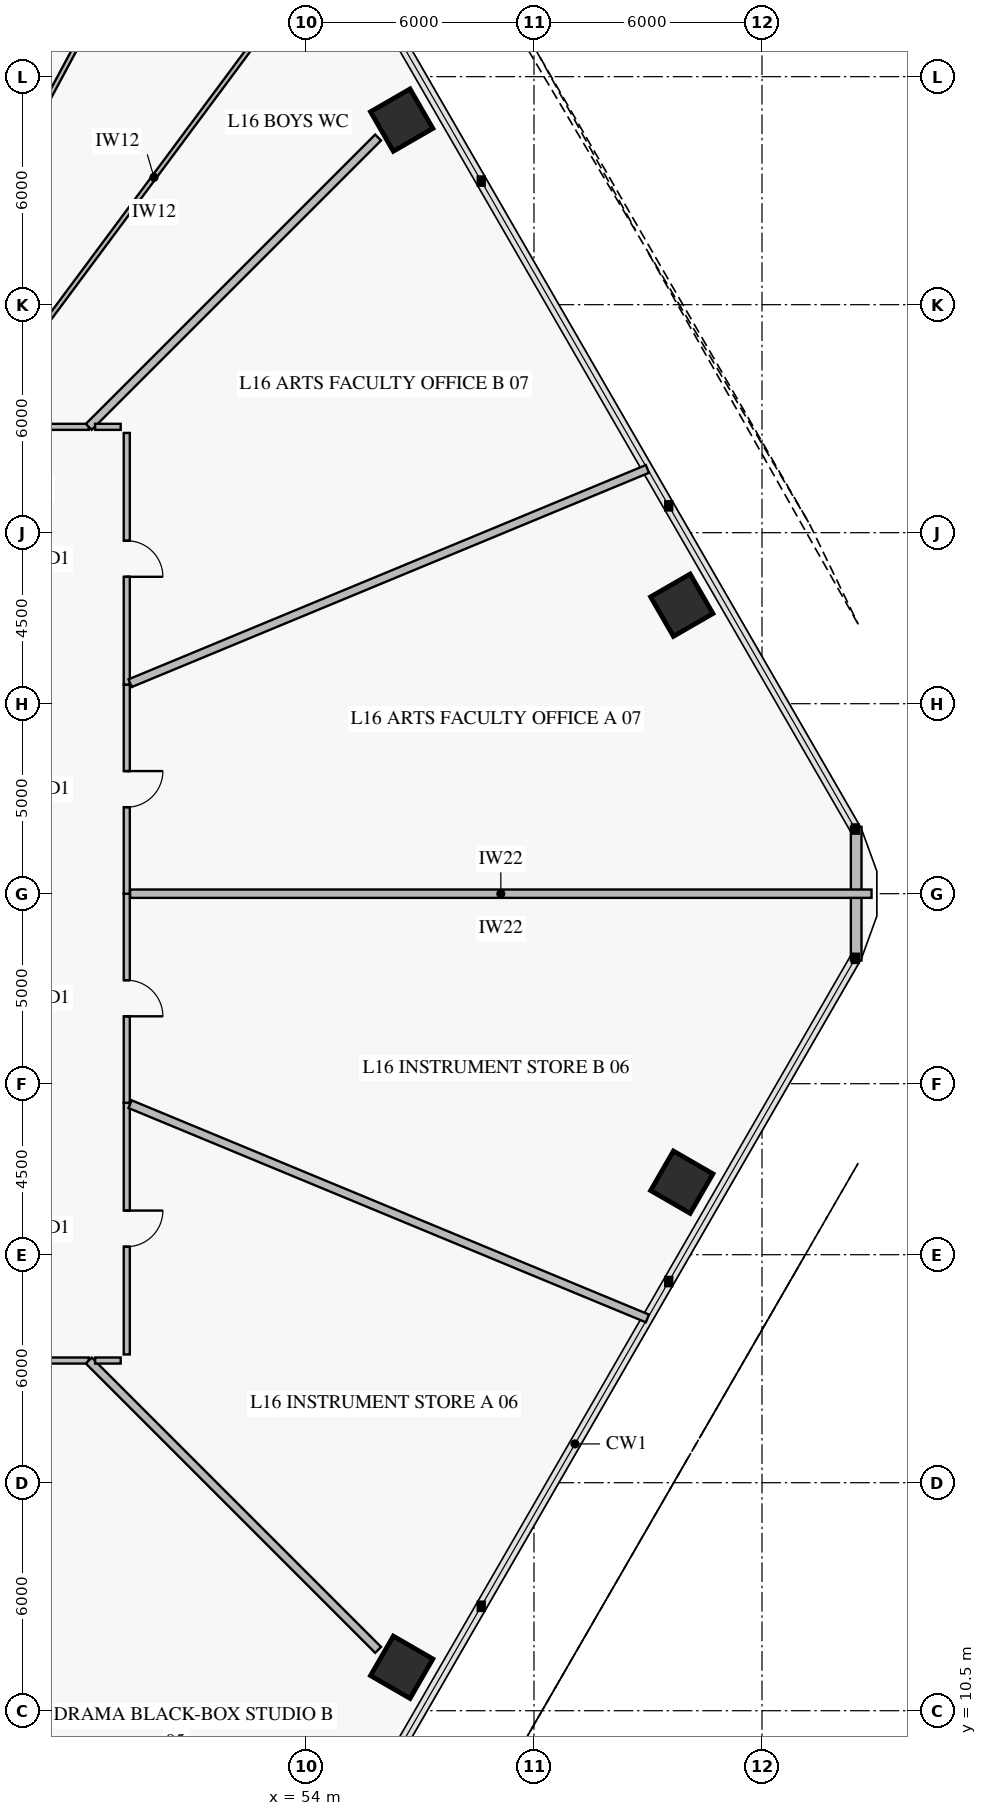
"""IFC4 building model, lengths in metres.
Left out: names, types, materials, properties, quantities, classifications, styles, units other than length and angle.
Written with IfcOpenShell. Run it as: python <this file> out.ifc"""

import sys

from ifc_helpers import new_model, si_unit, direction, frame, frame_2d, origin, origin_2d, place, context, subcontext, project, spatial, rectangle, extrude, element, fill, save


model = new_model("IFC4")
c1 = context("Model", 3, precision=1e-05, world=origin(), true_north=direction((0.0, 1.0)))
c2 = subcontext(c1, "Body", "Model", "MODEL_VIEW")
j1 = project(units=[si_unit("LENGTHUNIT", "METRE"), si_unit("PLANEANGLEUNIT", "RADIAN")], contexts=[c1])
p1 = place(None, origin())
s1 = spatial("IfcSite", under=j1, at=p1, CompositionType="ELEMENT")
p2 = place(p1, origin())
s2 = spatial("IfcBuilding", under=s1, at=p2, CompositionType="ELEMENT")
p3 = place(p2, frame((0.0, 0.0, 66.6)))
s3 = spatial("IfcBuildingStorey", under=s2, at=p3, CompositionType="ELEMENT", Elevation=66.6)
for number, where, z_axis, x_axis in (
    (1, (63.889, 39.592, 0.0), (0.0, 0.0, 1.0), (-0.5, 0.866, 0.0)),
    (2, (56.519, 52.357, 0.0), (0.0, 0.0, 1.0), (-0.5, 0.866, 0.0)),
    (3, (56.519, 11.643, 0.0), (0.0, 0.0, 1.0), (0.5, 0.866, 0.0)),
    (4, (63.889, 24.408, 0.0), (0.0, 0.0, 1.0), (0.5, 0.866, 0.0)),
):
    element("IfcColumn", number, at=place(p3, frame(where, z_axis=z_axis, x_axis=x_axis)), inside=s3, PredefinedType="COLUMN", context=c2, shape_type="SweptSolid", body=[
        extrude(rectangle(XDim=1.2, YDim=1.2, at=origin_2d()), origin(), (0.0, 0.0, 1.0), 3.92),
    ])
p4 = place(p3, frame((68.479, 33.758, 0.0), z_axis=(0.0, 0.0, 1.0), x_axis=(0.0, -1.0, 0.0)))
e5 = element("IfcWall", 5, at=p4, inside=s3, PredefinedType="SOLIDWALL", context=c2, shape_type="SweptSolid", body=[
    extrude(rectangle(XDim=3.515, YDim=0.28, at=frame_2d((1.758, 0.0))), origin(), (0.0, 0.0, 1.0), 3.92),
])
p5 = place(p3, frame((48.285, 44.285, 0.0), z_axis=(0.0, 0.0, 1.0), x_axis=(-1.0, 0.0, 0.0)))
e6 = element("IfcWall", 6, at=p5, inside=s3, PredefinedType="PARTITIONING", context=c2, shape_type="SweptSolid", body=[
    extrude(rectangle(XDim=3.161, YDim=0.16, at=frame_2d((1.581, 0.0))), origin(), (0.0, 0.0, 1.0), 3.22),
])
p6 = place(p5, frame((1.131, 0.0, 0.0)))
e7 = element("IfcOpeningElement", 7, at=p6, cuts=e6, PredefinedType="OPENING", context=c2, shape_type="SweptSolid", body=[
    extrude(rectangle(XDim=0.9, YDim=2.1, at=frame_2d((0.45, 1.05))), frame((0.0, 0.092, 0.0), z_axis=(0.0, -1.0, 0.0), x_axis=(1.0, 0.0, 0.0)), (0.0, 0.0, 1.0), 0.184),
])
p7 = place(p3, frame((40.963, 19.715, 0.0), z_axis=(0.0, 0.0, 1.0), x_axis=(1.0, 0.0, 0.0)))
e8 = element("IfcWall", 8, at=p7, inside=s3, PredefinedType="PARTITIONING", context=c2, shape_type="SweptSolid", body=[
    extrude(rectangle(XDim=7.322, YDim=0.16, at=frame_2d((3.661, 0.0))), origin(), (0.0, 0.0, 1.0), 3.22),
])
p8 = place(p7, frame((3.086, 0.0, 0.0)))
e9 = element("IfcOpeningElement", 9, at=p8, cuts=e8, PredefinedType="OPENING", context=c2, shape_type="SweptSolid", body=[
    extrude(rectangle(XDim=1.15, YDim=2.2, at=frame_2d((0.575, 1.1))), frame((0.0, 0.092, 0.0), z_axis=(0.0, -1.0, 0.0), x_axis=(1.0, 0.0, 0.0)), (0.0, 0.0, 1.0), 0.184),
])
p9 = place(p3, frame((49.285, 19.875, 0.0), z_axis=(0.0, 0.0, 1.0), x_axis=(0.0, 1.0, 0.0)))
e10 = element("IfcWall", 10, at=p9, inside=s3, PredefinedType="PARTITIONING", context=c2, shape_type="SweptSolid", body=[
    extrude(rectangle(XDim=6.622, YDim=0.16, at=frame_2d((3.311, 0.0))), origin(), (0.0, 0.0, 1.0), 3.92),
])
p10 = place(p9, frame((2.836, 0.0, 0.0)))
e11 = element("IfcOpeningElement", 11, at=p10, cuts=e10, PredefinedType="OPENING", context=c2, shape_type="SweptSolid", body=[
    extrude(rectangle(XDim=0.95, YDim=2.1, at=frame_2d((0.475, 1.05))), frame((0.0, 0.092, 0.0), z_axis=(0.0, -1.0, 0.0), x_axis=(1.0, 0.0, 0.0)), (0.0, 0.0, 1.0), 0.184),
])
p11 = place(p3, frame((49.285, 26.497, 0.0), z_axis=(0.0, 0.0, 1.0), x_axis=(0.0, 1.0, 0.0)))
e12 = element("IfcWall", 12, at=p11, inside=s3, PredefinedType="PARTITIONING", context=c2, shape_type="SweptSolid", body=[
    extrude(rectangle(XDim=5.503, YDim=0.16, at=frame_2d((2.751, 0.0))), origin(), (0.0, 0.0, 1.0), 3.22),
])
p12 = place(p11, frame((2.276, 0.0, 0.0)))
e13 = element("IfcOpeningElement", 13, at=p12, cuts=e12, PredefinedType="OPENING", context=c2, shape_type="SweptSolid", body=[
    extrude(rectangle(XDim=0.95, YDim=2.1, at=frame_2d((0.475, 1.05))), frame((0.0, 0.092, 0.0), z_axis=(0.0, -1.0, 0.0), x_axis=(1.0, 0.0, 0.0)), (0.0, 0.0, 1.0), 0.184),
])
p13 = place(p3, frame((49.285, 32.0, 0.0), z_axis=(0.0, 0.0, 1.0), x_axis=(0.0, 1.0, 0.0)))
e14 = element("IfcWall", 14, at=p13, inside=s3, PredefinedType="PARTITIONING", context=c2, shape_type="SweptSolid", body=[
    extrude(rectangle(XDim=5.503, YDim=0.16, at=frame_2d((2.751, 0.0))), origin(), (0.0, 0.0, 1.0), 3.22),
])
p14 = place(p13, frame((2.276, 0.0, 0.0)))
e15 = element("IfcOpeningElement", 15, at=p14, cuts=e14, PredefinedType="OPENING", context=c2, shape_type="SweptSolid", body=[
    extrude(rectangle(XDim=0.95, YDim=2.1, at=frame_2d((0.475, 1.05))), frame((0.0, 0.092, 0.0), z_axis=(0.0, -1.0, 0.0), x_axis=(1.0, 0.0, 0.0)), (0.0, 0.0, 1.0), 0.184),
])
p15 = place(p3, frame((49.285, 37.503, 0.0), z_axis=(0.0, 0.0, 1.0), x_axis=(0.0, 1.0, 0.0)))
e16 = element("IfcWall", 16, at=p15, inside=s3, PredefinedType="PARTITIONING", context=c2, shape_type="SweptSolid", body=[
    extrude(rectangle(XDim=6.622, YDim=0.16, at=frame_2d((3.311, 0.0))), origin(), (0.0, 0.0, 1.0), 3.92),
])
p16 = place(p15, frame((2.836, 0.0, 0.0)))
e17 = element("IfcOpeningElement", 17, at=p16, cuts=e16, PredefinedType="OPENING", context=c2, shape_type="SweptSolid", body=[
    extrude(rectangle(XDim=0.95, YDim=2.1, at=frame_2d((0.475, 1.05))), frame((0.0, 0.092, 0.0), z_axis=(0.0, -1.0, 0.0), x_axis=(1.0, 0.0, 0.0)), (0.0, 0.0, 1.0), 0.184),
])
p17 = place(p3, frame((48.285, 44.285, 0.0), z_axis=(0.0, 0.0, 1.0), x_axis=(0.707106781187, 0.707106781187, 0.0)))
e18 = element("IfcWall", 18, at=p17, inside=s3, PredefinedType="PARTITIONING", context=c2, shape_type="SweptSolid", body=[
    extrude(rectangle(XDim=10.768, YDim=0.22, at=frame_2d((5.384, 0.0))), origin(), (0.0, 0.0, 1.0), 3.22),
])
p18 = place(p3, frame((45.189, 44.373, 0.0), z_axis=(0.0, 0.0, 1.0), x_axis=(0.596225418148, 0.802817071788, 0.0)))
e19 = element("IfcWall", 19, at=p18, inside=s3, PredefinedType="PARTITIONING", context=c2, shape_type="SweptSolid", body=[
    extrude(rectangle(XDim=16.142, YDim=0.12, at=frame_2d((8.071, 0.0))), origin(), (0.0, 0.0, 1.0), 3.17),
])
p19 = place(p3, frame((44.844, 48.493, 0.0), z_axis=(0.0, 0.0, 1.0), x_axis=(0.472553457508, 0.881302008279, 0.0)))
e20 = element("IfcWall", 20, at=p19, inside=s3, PredefinedType="PARTITIONING", context=c2, shape_type="SweptSolid", body=[
    extrude(rectangle(XDim=14.016, YDim=0.12, at=frame_2d((7.008, 0.0))), origin(), (0.0, 0.0, 1.0), 3.17),
])
p20 = place(p3, frame((40.999, 19.627, 0.0), z_axis=(0.0, 0.0, 1.0), x_axis=(0.374605213306, -0.927184412166, 0.0)))
e21 = element("IfcWall", 21, at=p20, inside=s3, PredefinedType="PARTITIONING", context=c2, shape_type="SweptSolid", body=[
    extrude(rectangle(XDim=17.888, YDim=0.22, at=frame_2d((8.944, 0.0))), origin(), (0.0, 0.0, 1.0), 3.17),
])
p21 = place(p3, frame((48.285, 19.715, 0.0), z_axis=(0.0, 0.0, 1.0), x_axis=(0.707106781187, -0.707106781187, 0.0)))
e22 = element("IfcWall", 22, at=p21, inside=s3, PredefinedType="PARTITIONING", context=c2, shape_type="SweptSolid", body=[
    extrude(rectangle(XDim=10.768, YDim=0.22, at=frame_2d((5.384, 0.0))), origin(), (0.0, 0.0, 1.0), 3.22),
])
p22 = place(p3, frame((49.373, 26.461, 0.0), z_axis=(0.0, 0.0, 1.0), x_axis=(0.923882327997, -0.382676683396, 0.0)))
e23 = element("IfcWall", 23, at=p22, inside=s3, PredefinedType="PARTITIONING", context=c2, shape_type="SweptSolid", body=[
    extrude(rectangle(XDim=14.734, YDim=0.22, at=frame_2d((7.367, 0.0))), origin(), (0.0, 0.0, 1.0), 3.17),
])
p23 = place(p3, frame((48.452, 19.715, 0.0), z_axis=(0.0, 0.0, 1.0), x_axis=(1.0, 0.0, 0.0)))
e24 = element("IfcWall", 24, at=p23, inside=s3, PredefinedType="PARTITIONING", context=c2, shape_type="SweptSolid", body=[
    extrude(rectangle(XDim=0.673, YDim=0.16, at=frame_2d((0.336, 0.0))), origin(), (0.0, 0.0, 1.0), 3.22),
])
p24 = place(p3, frame((49.373, 32.0, 0.0), z_axis=(0.0, 0.0, 1.0), x_axis=(1.0, 0.0, 0.0)))
e25 = element("IfcWall", 25, at=p24, inside=s3, PredefinedType="PARTITIONING", context=c2, shape_type="SweptSolid", body=[
    extrude(rectangle(XDim=19.509, YDim=0.22, at=frame_2d((9.755, 0.0))), origin(), (0.0, 0.0, 1.0), 3.17),
])
p25 = place(p3, frame((49.373, 37.539, 0.0), z_axis=(0.0, 0.0, 1.0), x_axis=(0.923882327997, 0.382676683396, 0.0)))
e26 = element("IfcWall", 26, at=p25, inside=s3, PredefinedType="PARTITIONING", context=c2, shape_type="SweptSolid", body=[
    extrude(rectangle(XDim=14.734, YDim=0.22, at=frame_2d((7.367, 0.0))), origin(), (0.0, 0.0, 1.0), 3.17),
])
p26 = place(p3, frame((49.125, 44.285, 0.0), z_axis=(0.0, 0.0, 1.0), x_axis=(-1.0, 0.0, 0.0)))
e27 = element("IfcWall", 27, at=p26, inside=s3, PredefinedType="PARTITIONING", context=c2, shape_type="SweptSolid", body=[
    extrude(rectangle(XDim=0.673, YDim=0.16, at=frame_2d((0.336, 0.0))), origin(), (0.0, 0.0, 1.0), 3.22),
])
p27 = place(p10, frame((0.95, 0.0, 0.0), z_axis=(0.0, 0.0, 1.0), x_axis=(-1.0, 0.0, 0.0)))
e28 = element("IfcDoor", 28, at=p27, inside=s3, OperationType="SINGLE_SWING_LEFT", PredefinedType="DOOR", context=c2, shape_type="SweptSolid", body=[
    extrude(rectangle(XDim=0.95, YDim=2.1, at=frame_2d((0.475, 1.05))), frame((0.0, 0.025, 0.0), z_axis=(0.0, -1.0, 0.0), x_axis=(1.0, 0.0, 0.0)), (0.0, 0.0, 1.0), 0.05),
])
fill(e11, e28)
p28 = place(p12, frame((0.95, 0.0, 0.0), z_axis=(0.0, 0.0, 1.0), x_axis=(-1.0, 0.0, 0.0)))
e29 = element("IfcDoor", 29, at=p28, inside=s3, OperationType="SINGLE_SWING_RIGHT", PredefinedType="DOOR", context=c2, shape_type="SweptSolid", body=[
    extrude(rectangle(XDim=0.95, YDim=2.1, at=frame_2d((0.475, 1.05))), frame((0.0, 0.025, 0.0), z_axis=(0.0, -1.0, 0.0), x_axis=(1.0, 0.0, 0.0)), (0.0, 0.0, 1.0), 0.05),
])
fill(e13, e29)
p29 = place(p14, frame((0.95, 0.0, 0.0), z_axis=(0.0, 0.0, 1.0), x_axis=(-1.0, 0.0, 0.0)))
e30 = element("IfcDoor", 30, at=p29, inside=s3, OperationType="SINGLE_SWING_LEFT", PredefinedType="DOOR", context=c2, shape_type="SweptSolid", body=[
    extrude(rectangle(XDim=0.95, YDim=2.1, at=frame_2d((0.475, 1.05))), frame((0.0, 0.025, 0.0), z_axis=(0.0, -1.0, 0.0), x_axis=(1.0, 0.0, 0.0)), (0.0, 0.0, 1.0), 0.05),
])
fill(e15, e30)
p30 = place(p16, frame((0.95, 0.0, 0.0), z_axis=(0.0, 0.0, 1.0), x_axis=(-1.0, 0.0, 0.0)))
e31 = element("IfcDoor", 31, at=p30, inside=s3, OperationType="SINGLE_SWING_RIGHT", PredefinedType="DOOR", context=c2, shape_type="SweptSolid", body=[
    extrude(rectangle(XDim=0.95, YDim=2.1, at=frame_2d((0.475, 1.05))), frame((0.0, 0.025, 0.0), z_axis=(0.0, -1.0, 0.0), x_axis=(1.0, 0.0, 0.0)), (0.0, 0.0, 1.0), 0.05),
])
fill(e17, e31)
save(model, sys.argv[1])
